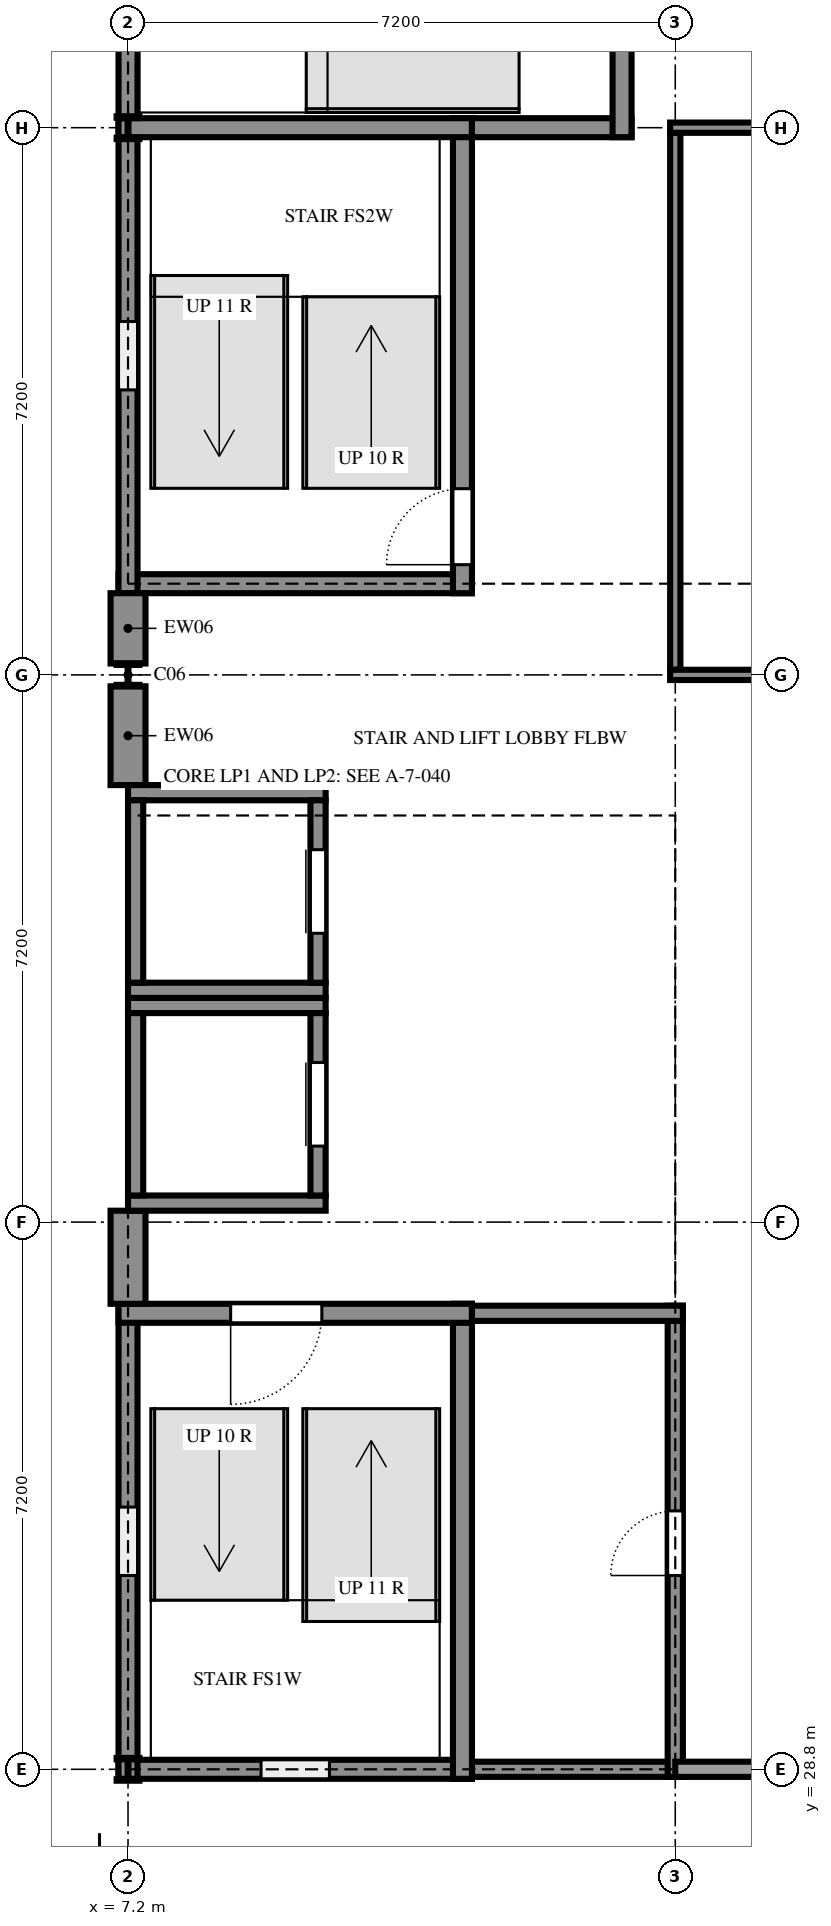
"""IFC4 building model, lengths in metres.
Left out: names, types, materials, properties, quantities, classifications, styles, units other than length and angle.
Written with IfcOpenShell. Run it as: python <this file> out.ifc"""

import sys

from ifc_helpers import new_model, si_unit, direction, frame, frame_2d, origin, origin_2d, place, context, subcontext, project, spatial, rectangle, i_section, extrude, element, fill, save


model = new_model("IFC4")
c1 = context("Model", 3, precision=1e-05, world=origin(), true_north=direction((0.0, 1.0)))
c2 = subcontext(c1, "Body", "Model", "MODEL_VIEW")
j1 = project(units=[si_unit("LENGTHUNIT", "METRE"), si_unit("PLANEANGLEUNIT", "RADIAN")], contexts=[c1])
p1 = place(None, origin())
s1 = spatial("IfcSite", under=j1, at=p1, CompositionType="ELEMENT")
p2 = place(p1, origin())
s2 = spatial("IfcBuilding", under=s1, at=p2, CompositionType="ELEMENT")
p3 = place(p2, frame((0.0, 0.0, 7.2)))
s3 = spatial("IfcBuildingStorey", under=s2, at=p3, CompositionType="ELEMENT", Elevation=7.2)
for number, where, z_axis, x_axis in (
    (1, (7.2, 28.8, 0.0), (0.0, 0.0, 1.0), (1.0, 0.0, 0.0)),
    (2, (7.2, 43.2, 0.0), (0.0, 0.0, 1.0), (1.0, 0.0, 0.0)),
    (3, (7.2, 50.4, 0.0), (0.0, 0.0, 1.0), (1.0, 0.0, 0.0)),
):
    element("IfcColumn", number, at=place(p3, frame(where, z_axis=z_axis, x_axis=x_axis)), inside=s3, PredefinedType="COLUMN", context=c2, shape_type="SweptSolid", body=[
        extrude(i_section(OverallWidth=0.3, OverallDepth=0.3, WebThickness=0.011, FlangeThickness=0.019, FilletRadius=0.027, at=origin_2d()), origin(), (0.0, 0.0, 1.0), 3.6),
    ])
p4 = place(p3, frame((7.075, 28.8, 0.0), z_axis=(0.0, 0.0, 1.0), x_axis=(1.0, 0.0, 0.0)))
e4 = element("IfcWall", 4, at=p4, inside=s3, PredefinedType="SHEAR", context=c2, shape_type="SweptSolid", body=[
    extrude(rectangle(XDim=4.65, YDim=0.25, at=frame_2d((2.325, 0.0))), origin(), (0.0, 0.0, 1.0), 3.6),
])
p5 = place(p4, frame((1.875, 0.0, 0.6)))
e5 = element("IfcOpeningElement", 5, at=p5, cuts=e4, PredefinedType="OPENING", context=c2, shape_type="SweptSolid", body=[
    extrude(rectangle(XDim=0.9, YDim=2.1, at=frame_2d((0.45, 1.05))), frame((0.0, 0.135, 0.0), z_axis=(0.0, -1.0, 0.0), x_axis=(1.0, 0.0, 0.0)), (0.0, 0.0, 1.0), 0.27),
])
p6 = place(p3, frame((11.725, 28.8, 0.0), z_axis=(0.0, 0.0, 1.0), x_axis=(1.0, 0.0, 0.0)))
e6 = element("IfcWall", 6, at=p6, inside=s3, PredefinedType="SHEAR", context=c2, shape_type="SweptSolid", body=[
    extrude(rectangle(XDim=2.775, YDim=0.2, at=frame_2d((1.387, 0.0))), origin(), (0.0, 0.0, 1.0), 3.6),
])
p7 = place(p3, frame((11.6, 28.675, 0.0), z_axis=(0.0, 0.0, 1.0), x_axis=(0.0, 1.0, 0.0)))
e7 = element("IfcWall", 7, at=p7, inside=s3, PredefinedType="SHEAR", context=c2, shape_type="SweptSolid", body=[
    extrude(rectangle(XDim=6.25, YDim=0.25, at=frame_2d((3.125, 0.0))), origin(), (0.0, 0.0, 1.0), 3.6),
])
p8 = place(p3, frame((14.4, 28.7, 0.0), z_axis=(0.0, 0.0, 1.0), x_axis=(0.0, 1.0, 0.0)))
e8 = element("IfcWall", 8, at=p8, inside=s3, PredefinedType="SHEAR", context=c2, shape_type="SweptSolid", body=[
    extrude(rectangle(XDim=6.2, YDim=0.2, at=frame_2d((3.1, 0.0))), origin(), (0.0, 0.0, 1.0), 3.6),
])
p9 = place(p8, frame((2.65, 0.0, 0.0)))
e9 = element("IfcOpeningElement", 9, at=p9, cuts=e8, PredefinedType="OPENING", context=c2, shape_type="SweptSolid", body=[
    extrude(rectangle(XDim=0.85, YDim=2.1, at=frame_2d((0.425, 1.05))), frame((0.0, 0.11, 0.0), z_axis=(0.0, -1.0, 0.0), x_axis=(1.0, 0.0, 0.0)), (0.0, 0.0, 1.0), 0.22),
])
p10 = place(p3, frame((7.2, 34.925, 0.0), z_axis=(0.0, 0.0, 1.0), x_axis=(0.0, -1.0, 0.0)))
e10 = element("IfcWall", 10, at=p10, inside=s3, PredefinedType="SHEAR", context=c2, shape_type="SweptSolid", body=[
    extrude(rectangle(XDim=6.25, YDim=0.25, at=frame_2d((3.125, 0.0))), origin(), (0.0, 0.0, 1.0), 3.6),
])
p11 = place(p10, frame((2.675, 0.0, 0.6)))
e11 = element("IfcOpeningElement", 11, at=p11, cuts=e10, PredefinedType="OPENING", context=c2, shape_type="SweptSolid", body=[
    extrude(rectangle(XDim=0.9, YDim=2.1, at=frame_2d((0.45, 1.05))), frame((0.0, 0.135, 0.0), z_axis=(0.0, -1.0, 0.0), x_axis=(1.0, 0.0, 0.0)), (0.0, 0.0, 1.0), 0.27),
])
p12 = place(p3, frame((11.725, 34.8, 0.0), z_axis=(0.0, 0.0, 1.0), x_axis=(-1.0, 0.0, 0.0)))
e12 = element("IfcWall", 12, at=p12, inside=s3, PredefinedType="SHEAR", context=c2, shape_type="SweptSolid", body=[
    extrude(rectangle(XDim=4.65, YDim=0.25, at=frame_2d((2.325, 0.0))), origin(), (0.0, 0.0, 1.0), 3.6),
])
p13 = place(p12, frame((1.975, 0.0, 0.0)))
e13 = element("IfcOpeningElement", 13, at=p13, cuts=e12, PredefinedType="OPENING", context=c2, shape_type="SweptSolid", body=[
    extrude(rectangle(XDim=1.2, YDim=2.4, at=frame_2d((0.6, 1.2))), frame((0.0, 0.135, 0.0), z_axis=(0.0, -1.0, 0.0), x_axis=(1.0, 0.0, 0.0)), (0.0, 0.0, 1.0), 0.27),
])
p14 = place(p3, frame((14.5, 34.8, 0.0), z_axis=(0.0, 0.0, 1.0), x_axis=(-1.0, 0.0, 0.0)))
e14 = element("IfcWall", 14, at=p14, inside=s3, PredefinedType="SHEAR", context=c2, shape_type="SweptSolid", body=[
    extrude(rectangle(XDim=2.775, YDim=0.2, at=frame_2d((1.387, 0.0))), origin(), (0.0, 0.0, 1.0), 3.6),
])
p15 = place(p3, frame((7.075, 44.4, 0.0), z_axis=(0.0, 0.0, 1.0), x_axis=(1.0, 0.0, 0.0)))
e15 = element("IfcWall", 15, at=p15, inside=s3, PredefinedType="SHEAR", context=c2, shape_type="SweptSolid", body=[
    extrude(rectangle(XDim=4.65, YDim=0.25, at=frame_2d((2.325, 0.0))), origin(), (0.0, 0.0, 1.0), 3.6),
])
p16 = place(p3, frame((11.6, 44.275, 0.0), z_axis=(0.0, 0.0, 1.0), x_axis=(0.0, 1.0, 0.0)))
e16 = element("IfcWall", 16, at=p16, inside=s3, PredefinedType="SHEAR", context=c2, shape_type="SweptSolid", body=[
    extrude(rectangle(XDim=6.25, YDim=0.25, at=frame_2d((3.125, 0.0))), origin(), (0.0, 0.0, 1.0), 3.6),
])
p17 = place(p16, frame((0.375, 0.0, 0.0)))
e17 = element("IfcOpeningElement", 17, at=p17, cuts=e16, PredefinedType="OPENING", context=c2, shape_type="SweptSolid", body=[
    extrude(rectangle(XDim=1.0, YDim=2.4, at=frame_2d((0.5, 1.2))), frame((0.0, 0.135, 0.0), z_axis=(0.0, -1.0, 0.0), x_axis=(1.0, 0.0, 0.0)), (0.0, 0.0, 1.0), 0.27),
])
p18 = place(p3, frame((7.2, 50.525, 0.0), z_axis=(0.0, 0.0, 1.0), x_axis=(0.0, -1.0, 0.0)))
e18 = element("IfcWall", 18, at=p18, inside=s3, PredefinedType="SHEAR", context=c2, shape_type="SweptSolid", body=[
    extrude(rectangle(XDim=6.25, YDim=0.25, at=frame_2d((3.125, 0.0))), origin(), (0.0, 0.0, 1.0), 3.6),
])
p19 = place(p18, frame((2.675, 0.0, 0.6)))
e19 = element("IfcOpeningElement", 19, at=p19, cuts=e18, PredefinedType="OPENING", context=c2, shape_type="SweptSolid", body=[
    extrude(rectangle(XDim=0.9, YDim=2.1, at=frame_2d((0.45, 1.05))), frame((0.0, 0.135, 0.0), z_axis=(0.0, -1.0, 0.0), x_axis=(1.0, 0.0, 0.0)), (0.0, 0.0, 1.0), 0.27),
])
p20 = place(p3, frame((11.725, 50.4, 0.0), z_axis=(0.0, 0.0, 1.0), x_axis=(-1.0, 0.0, 0.0)))
e20 = element("IfcWall", 20, at=p20, inside=s3, PredefinedType="SHEAR", context=c2, shape_type="SweptSolid", body=[
    extrude(rectangle(XDim=4.65, YDim=0.25, at=frame_2d((2.325, 0.0))), origin(), (0.0, 0.0, 1.0), 3.6),
])
p21 = place(p3, frame((11.725, 50.4, 0.0), z_axis=(0.0, 0.0, 1.0), x_axis=(1.0, 0.0, 0.0)))
e21 = element("IfcWall", 21, at=p21, inside=s3, PredefinedType="SHEAR", context=c2, shape_type="SweptSolid", body=[
    extrude(rectangle(XDim=2.1, YDim=0.25, at=frame_2d((1.05, 0.0))), origin(), (0.0, 0.0, 1.0), 3.6),
])
p22 = place(p3, frame((13.7, 50.275, 0.0), z_axis=(0.0, 0.0, 1.0), x_axis=(0.0, 1.0, 0.0)))
e22 = element("IfcWall", 22, at=p22, inside=s3, PredefinedType="SHEAR", context=c2, shape_type="SweptSolid", body=[
    extrude(rectangle(XDim=5.25, YDim=0.25, at=frame_2d((2.625, 0.0))), origin(), (0.0, 0.0, 1.0), 3.6),
])
p23 = place(p22, frame((1.975, 0.0, 0.0)))
e23 = element("IfcOpeningElement", 23, at=p23, cuts=e22, PredefinedType="OPENING", context=c2, shape_type="SweptSolid", body=[
    extrude(rectangle(XDim=1.2, YDim=2.4, at=frame_2d((0.6, 1.2))), frame((0.0, 0.135, 0.0), z_axis=(0.0, -1.0, 0.0), x_axis=(1.0, 0.0, 0.0)), (0.0, 0.0, 1.0), 0.27),
])
p24 = place(p3, frame((7.2, 55.525, 0.0), z_axis=(0.0, 0.0, 1.0), x_axis=(0.0, -1.0, 0.0)))
e24 = element("IfcWall", 24, at=p24, inside=s3, PredefinedType="SHEAR", context=c2, shape_type="SweptSolid", body=[
    extrude(rectangle(XDim=5.0, YDim=0.25, at=frame_2d((2.5, 0.0))), origin(), (0.0, 0.0, 1.0), 3.6),
])
p25 = place(p24, frame((2.175, 0.0, 0.6)))
e25 = element("IfcOpeningElement", 25, at=p25, cuts=e24, PredefinedType="OPENING", context=c2, shape_type="SweptSolid", body=[
    extrude(rectangle(XDim=0.9, YDim=2.1, at=frame_2d((0.45, 1.05))), frame((0.0, 0.135, 0.0), z_axis=(0.0, -1.0, 0.0), x_axis=(1.0, 0.0, 0.0)), (0.0, 0.0, 1.0), 0.27),
])
p26 = place(p3, frame((7.2, 44.275, 0.0), z_axis=(0.0, 0.0, 1.0), x_axis=(0.0, -1.0, 0.0)))
e26 = element("IfcWall", 26, at=p26, inside=s3, PredefinedType="SOLIDWALL", context=c2, shape_type="SweptSolid", body=[
    extrude(rectangle(XDim=0.925, YDim=0.46, at=frame_2d((0.462, 0.0))), origin(), (0.0, 0.0, 1.0), 3.22),
])
p27 = place(p3, frame((7.2, 43.05, 0.0), z_axis=(0.0, 0.0, 1.0), x_axis=(0.0, -1.0, 0.0)))
e27 = element("IfcWall", 27, at=p27, inside=s3, PredefinedType="SOLIDWALL", context=c2, shape_type="SweptSolid", body=[
    extrude(rectangle(XDim=1.3, YDim=0.46, at=frame_2d((0.65, 0.0))), origin(), (0.0, 0.0, 1.0), 3.22),
])
p28 = place(p3, frame((7.2, 36.15, 0.0), z_axis=(0.0, 0.0, 1.0), x_axis=(0.0, -1.0, 0.0)))
e28 = element("IfcWall", 28, at=p28, inside=s3, PredefinedType="SOLIDWALL", context=c2, shape_type="SweptSolid", body=[
    extrude(rectangle(XDim=1.225, YDim=0.46, at=frame_2d((0.612, 0.0))), origin(), (0.0, 0.0, 1.0), 3.22),
])
for number, where, z_axis, x_axis in (
    (29, (7.2, 36.25, 0.0), (0.0, 0.0, 1.0), (1.0, 0.0, 0.0)),
    (30, (7.2, 38.85, 0.0), (0.0, 0.0, 1.0), (1.0, 0.0, 0.0)),
):
    element("IfcWall", number, at=place(p3, frame(where, z_axis=z_axis, x_axis=x_axis)), inside=s3, PredefinedType="SHEAR", context=c2, shape_type="SweptSolid", body=[
        extrude(rectangle(XDim=2.6, YDim=0.2, at=frame_2d((1.3, 0.0))), origin(), (0.0, 0.0, 1.0), 3.6),
    ])
p29 = place(p3, frame((7.3, 36.35, 0.0), z_axis=(0.0, 0.0, 1.0), x_axis=(0.0, 1.0, 0.0)))
e31 = element("IfcWall", 31, at=p29, inside=s3, PredefinedType="SHEAR", context=c2, shape_type="SweptSolid", body=[
    extrude(rectangle(XDim=2.4, YDim=0.2, at=frame_2d((1.2, 0.0))), origin(), (0.0, 0.0, 1.0), 3.6),
])
p30 = place(p3, frame((9.7, 36.35, 0.0), z_axis=(0.0, 0.0, 1.0), x_axis=(0.0, 1.0, 0.0)))
e32 = element("IfcWall", 32, at=p30, inside=s3, PredefinedType="SHEAR", context=c2, shape_type="SweptSolid", body=[
    extrude(rectangle(XDim=2.4, YDim=0.2, at=frame_2d((1.2, 0.0))), origin(), (0.0, 0.0, 1.0), 3.6),
])
p31 = place(p30, frame((0.65, 0.0, 0.0)))
e33 = element("IfcOpeningElement", 33, at=p31, cuts=e32, PredefinedType="OPENING", context=c2, shape_type="SweptSolid", body=[
    extrude(rectangle(XDim=1.1, YDim=2.1, at=frame_2d((0.55, 1.05))), frame((0.0, 0.11, 0.0), z_axis=(0.0, -1.0, 0.0), x_axis=(1.0, 0.0, 0.0)), (0.0, 0.0, 1.0), 0.22),
])
for number, where, z_axis, x_axis in (
    (34, (7.2, 39.05, 0.0), (0.0, 0.0, 1.0), (1.0, 0.0, 0.0)),
    (35, (7.2, 41.65, 0.0), (0.0, 0.0, 1.0), (1.0, 0.0, 0.0)),
):
    element("IfcWall", number, at=place(p3, frame(where, z_axis=z_axis, x_axis=x_axis)), inside=s3, PredefinedType="SHEAR", context=c2, shape_type="SweptSolid", body=[
        extrude(rectangle(XDim=2.6, YDim=0.2, at=frame_2d((1.3, 0.0))), origin(), (0.0, 0.0, 1.0), 3.6),
    ])
p32 = place(p3, frame((7.3, 39.15, 0.0), z_axis=(0.0, 0.0, 1.0), x_axis=(0.0, 1.0, 0.0)))
e36 = element("IfcWall", 36, at=p32, inside=s3, PredefinedType="SHEAR", context=c2, shape_type="SweptSolid", body=[
    extrude(rectangle(XDim=2.4, YDim=0.2, at=frame_2d((1.2, 0.0))), origin(), (0.0, 0.0, 1.0), 3.6),
])
p33 = place(p3, frame((9.7, 39.15, 0.0), z_axis=(0.0, 0.0, 1.0), x_axis=(0.0, 1.0, 0.0)))
e37 = element("IfcWall", 37, at=p33, inside=s3, PredefinedType="SHEAR", context=c2, shape_type="SweptSolid", body=[
    extrude(rectangle(XDim=2.4, YDim=0.2, at=frame_2d((1.2, 0.0))), origin(), (0.0, 0.0, 1.0), 3.6),
])
p34 = place(p33, frame((0.65, 0.0, 0.0)))
e38 = element("IfcOpeningElement", 38, at=p34, cuts=e37, PredefinedType="OPENING", context=c2, shape_type="SweptSolid", body=[
    extrude(rectangle(XDim=1.1, YDim=2.1, at=frame_2d((0.55, 1.05))), frame((0.0, 0.11, 0.0), z_axis=(0.0, -1.0, 0.0), x_axis=(1.0, 0.0, 0.0)), (0.0, 0.0, 1.0), 0.22),
])
p35 = place(p3, frame((14.4, 50.333, 0.0), z_axis=(0.0, 0.0, 1.0), x_axis=(0.0, -1.0, 0.0)))
e39 = element("IfcWall", 39, at=p35, inside=s3, PredefinedType="PARTITIONING", context=c2, shape_type="SweptSolid", body=[
    extrude(rectangle(XDim=7.065, YDim=0.135, at=frame_2d((3.532, 0.0))), origin(), (0.0, 0.0, 1.0), 3.12),
])
p36 = place(p3, frame((18.0, 50.4, 0.0), z_axis=(0.0, 0.0, 1.0), x_axis=(-1.0, 0.0, 0.0)))
e40 = element("IfcWall", 40, at=p36, inside=s3, PredefinedType="PARTITIONING", context=c2, shape_type="SweptSolid", body=[
    extrude(rectangle(XDim=3.667, YDim=0.135, at=frame_2d((1.834, 0.0))), origin(), (0.0, 0.0, 1.0), 3.09),
])
p37 = place(p3, frame((14.333, 43.2, 0.0), z_axis=(0.0, 0.0, 1.0), x_axis=(1.0, 0.0, 0.0)))
e41 = element("IfcWall", 41, at=p37, inside=s3, PredefinedType="PARTITIONING", context=c2, shape_type="SweptSolid", body=[
    extrude(rectangle(XDim=8.317, YDim=0.135, at=frame_2d((4.159, 0.0))), origin(), (0.0, 0.0, 1.0), 2.82),
])
p38 = place(p37, frame((3.65, 0.0, 0.0)))
e42 = element("IfcOpeningElement", 42, at=p38, cuts=e41, PredefinedType="OPENING", context=c2, shape_type="SweptSolid", body=[
    extrude(rectangle(XDim=1.0, YDim=2.4, at=frame_2d((0.5, 1.2))), frame((0.0, 0.077, 0.0), z_axis=(0.0, -1.0, 0.0), x_axis=(1.0, 0.0, 0.0)), (0.0, 0.0, 1.0), 0.155),
])
p39 = place(p5, origin())
e43 = element("IfcWindow", 43, at=p39, inside=s3, PartitioningType="SINGLE_PANEL", PredefinedType="WINDOW", context=c2, shape_type="SweptSolid", body=[
    extrude(rectangle(XDim=0.9, YDim=2.1, at=frame_2d((0.45, 1.05))), frame((0.0, 0.03, 0.0), z_axis=(0.0, -1.0, 0.0), x_axis=(1.0, 0.0, 0.0)), (0.0, 0.0, 1.0), 0.06),
])
fill(e5, e43)
p40 = place(p19, origin())
e44 = element("IfcWindow", 44, at=p40, inside=s3, PartitioningType="SINGLE_PANEL", PredefinedType="WINDOW", context=c2, shape_type="SweptSolid", body=[
    extrude(rectangle(XDim=0.9, YDim=2.1, at=frame_2d((0.45, 1.05))), frame((0.0, 0.03, 0.0), z_axis=(0.0, -1.0, 0.0), x_axis=(1.0, 0.0, 0.0)), (0.0, 0.0, 1.0), 0.06),
])
fill(e19, e44)
p41 = place(p11, origin())
e45 = element("IfcWindow", 45, at=p41, inside=s3, PartitioningType="SINGLE_PANEL", PredefinedType="WINDOW", context=c2, shape_type="SweptSolid", body=[
    extrude(rectangle(XDim=0.9, YDim=2.1, at=frame_2d((0.45, 1.05))), frame((0.0, 0.03, 0.0), z_axis=(0.0, -1.0, 0.0), x_axis=(1.0, 0.0, 0.0)), (0.0, 0.0, 1.0), 0.06),
])
fill(e11, e45)
p42 = place(p31, origin())
e46 = element("IfcDoor", 46, at=p42, inside=s3, OperationType="SLIDING_TO_LEFT", PredefinedType="DOOR", context=c2, shape_type="SweptSolid", body=[
    extrude(rectangle(XDim=1.1, YDim=2.1, at=frame_2d((0.55, 1.05))), frame((0.0, 0.025, 0.0), z_axis=(0.0, -1.0, 0.0), x_axis=(1.0, 0.0, 0.0)), (0.0, 0.0, 1.0), 0.05),
])
fill(e33, e46)
p43 = place(p34, origin())
e47 = element("IfcDoor", 47, at=p43, inside=s3, OperationType="SLIDING_TO_LEFT", PredefinedType="DOOR", context=c2, shape_type="SweptSolid", body=[
    extrude(rectangle(XDim=1.1, YDim=2.1, at=frame_2d((0.55, 1.05))), frame((0.0, 0.025, 0.0), z_axis=(0.0, -1.0, 0.0), x_axis=(1.0, 0.0, 0.0)), (0.0, 0.0, 1.0), 0.05),
])
fill(e38, e47)
p44 = place(p13, origin())
e48 = element("IfcDoor", 48, at=p44, inside=s3, OperationType="SINGLE_SWING_LEFT", PredefinedType="DOOR", context=c2, shape_type="SweptSolid", body=[
    extrude(rectangle(XDim=1.2, YDim=2.4, at=frame_2d((0.6, 1.2))), frame((0.0, 0.025, 0.0), z_axis=(0.0, -1.0, 0.0), x_axis=(1.0, 0.0, 0.0)), (0.0, 0.0, 1.0), 0.05),
])
fill(e13, e48)
p45 = place(p17, origin())
e49 = element("IfcDoor", 49, at=p45, inside=s3, OperationType="SINGLE_SWING_RIGHT", PredefinedType="DOOR", context=c2, shape_type="SweptSolid", body=[
    extrude(rectangle(XDim=1.0, YDim=2.4, at=frame_2d((0.5, 1.2))), frame((0.0, 0.025, 0.0), z_axis=(0.0, -1.0, 0.0), x_axis=(1.0, 0.0, 0.0)), (0.0, 0.0, 1.0), 0.05),
])
fill(e17, e49)
p46 = place(p9, origin())
e50 = element("IfcDoor", 50, at=p46, inside=s3, OperationType="SINGLE_SWING_RIGHT", PredefinedType="DOOR", context=c2, shape_type="SweptSolid", body=[
    extrude(rectangle(XDim=0.85, YDim=2.1, at=frame_2d((0.425, 1.05))), frame((0.0, 0.025, 0.0), z_axis=(0.0, -1.0, 0.0), x_axis=(1.0, 0.0, 0.0)), (0.0, 0.0, 1.0), 0.05),
])
fill(e9, e50)
save(model, sys.argv[1])
